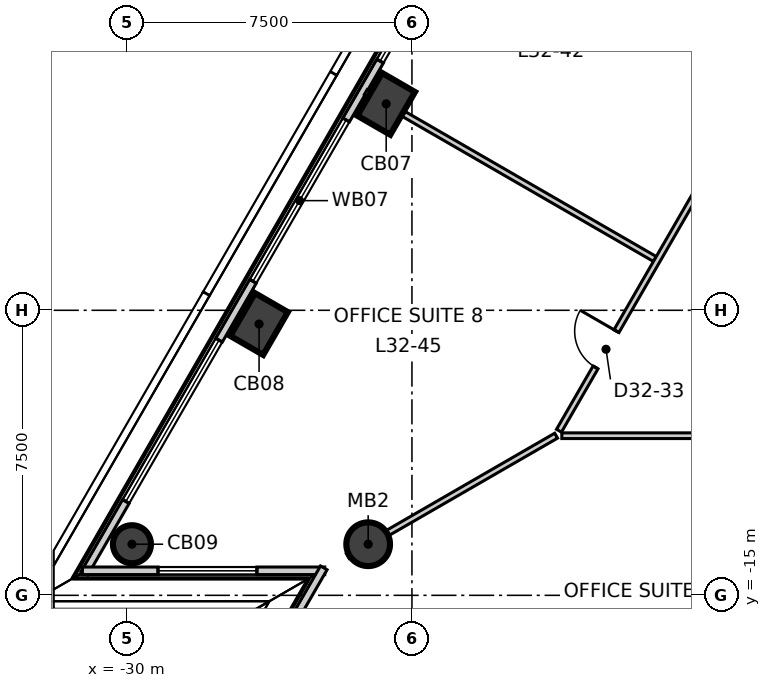
"""IFC4 building model, lengths in metres.
Left out: names, types, materials, properties, quantities, classifications, styles, units other than length and angle.
Written with IfcOpenShell. Run it as: python <this file> out.ifc"""

import sys

from ifc_helpers import new_model, si_unit, direction, frame, frame_2d, origin, origin_2d, place, context, subcontext, project, spatial, rectangle, circle, extrude, element, fill, save


model = new_model("IFC4")
c1 = context("Model", 3, precision=1e-05, world=origin(), true_north=direction((0.0, 1.0)))
c2 = subcontext(c1, "Body", "Model", "MODEL_VIEW")
j1 = project(units=[si_unit("LENGTHUNIT", "METRE"), si_unit("PLANEANGLEUNIT", "RADIAN")], contexts=[c1])
p1 = place(None, origin())
s1 = spatial("IfcSite", under=j1, at=p1, CompositionType="ELEMENT")
p2 = place(p1, origin())
s2 = spatial("IfcBuilding", under=s1, at=p2, CompositionType="ELEMENT")
p3 = place(p2, frame((0.0, 0.0, 140.3)))
s3 = spatial("IfcBuildingStorey", under=s2, at=p3, CompositionType="ELEMENT", Elevation=140.3)
for number, where, z_axis, x_axis in (
    (1, (-23.178, -2.068, -0.3), (0.0, 0.0, 1.0), (0.5, 0.866, 0.0)),
    (2, (-26.523, -7.861, -0.3), (0.0, 0.0, 1.0), (0.5, 0.866, 0.0)),
):
    element("IfcColumn", number, at=place(p3, frame(where, z_axis=z_axis, x_axis=x_axis)), inside=s3, PredefinedType="COLUMN", context=c2, shape_type="SweptSolid", body=[
        extrude(rectangle(XDim=1.3, YDim=1.0, at=origin_2d()), origin(), (0.0, 0.0, 1.0), 4.0),
    ])
p4 = place(p3, frame((-29.868, -13.655, -0.3), z_axis=(0.0, 0.0, 1.0), x_axis=(0.5, 0.866025403784, 0.0)))
e3 = element("IfcColumn", 3, at=p4, inside=s3, PredefinedType="COLUMN", context=c2, shape_type="SweptSolid", body=[
    extrude(circle(Radius=0.5, at=origin_2d()), origin(), (0.0, 0.0, 1.0), 4.0),
])
p5 = place(p3, frame((-23.652, -13.655, -0.3), z_axis=(0.0, 0.0, 1.0), x_axis=(1.0, 0.0, 0.0)))
e4 = element("IfcColumn", 4, at=p5, inside=s3, PredefinedType="COLUMN", context=c2, shape_type="SweptSolid", body=[
    extrude(circle(Radius=0.575, at=origin_2d()), origin(), (0.0, 0.0, 1.0), 4.0),
])
p6 = place(p3, frame((-3.063, 34.172, 0.0), z_axis=(0.0, 0.0, 1.0), x_axis=(-0.500008098571, -0.866020728022, 0.0)))
e5 = element("IfcWall", 5, at=p6, inside=s3, PredefinedType="ELEMENTEDWALL", context=c2, shape_type="SweptSolid", body=[
    extrude(rectangle(XDim=56.105, YDim=0.2, at=frame_2d((28.052, 0.0))), origin(), (0.0, 0.0, 1.0), 3.7),
])
p7 = place(p6, frame((2.197, 0.0, 0.9)))
e6 = element("IfcOpeningElement", 6, at=p7, cuts=e5, PredefinedType="OPENING", context=c2, shape_type="SweptSolid", body=[
    extrude(rectangle(XDim=4.9, YDim=2.5, at=frame_2d((2.45, 1.25))), frame((0.0, 0.11, 0.0), z_axis=(0.0, -1.0, 0.0), x_axis=(1.0, 0.0, 0.0)), (0.0, 0.0, 1.0), 0.22),
])
p8 = place(p6, frame((8.887, 0.0, 0.9)))
e7 = element("IfcOpeningElement", 7, at=p8, cuts=e5, PredefinedType="OPENING", context=c2, shape_type="SweptSolid", body=[
    extrude(rectangle(XDim=4.9, YDim=2.5, at=frame_2d((2.45, 1.25))), frame((0.0, 0.11, 0.0), z_axis=(0.0, -1.0, 0.0), x_axis=(1.0, 0.0, 0.0)), (0.0, 0.0, 1.0), 0.22),
])
p9 = place(p6, frame((15.577, 0.0, 0.9)))
e8 = element("IfcOpeningElement", 8, at=p9, cuts=e5, PredefinedType="OPENING", context=c2, shape_type="SweptSolid", body=[
    extrude(rectangle(XDim=4.9, YDim=2.5, at=frame_2d((2.45, 1.25))), frame((0.0, 0.11, 0.0), z_axis=(0.0, -1.0, 0.0), x_axis=(1.0, 0.0, 0.0)), (0.0, 0.0, 1.0), 0.22),
])
p10 = place(p6, frame((22.267, 0.0, 0.9)))
e9 = element("IfcOpeningElement", 9, at=p10, cuts=e5, PredefinedType="OPENING", context=c2, shape_type="SweptSolid", body=[
    extrude(rectangle(XDim=4.9, YDim=2.5, at=frame_2d((2.45, 1.25))), frame((0.0, 0.11, 0.0), z_axis=(0.0, -1.0, 0.0), x_axis=(1.0, 0.0, 0.0)), (0.0, 0.0, 1.0), 0.22),
])
p11 = place(p6, frame((28.957, 0.0, 0.9)))
e10 = element("IfcOpeningElement", 10, at=p11, cuts=e5, PredefinedType="OPENING", context=c2, shape_type="SweptSolid", body=[
    extrude(rectangle(XDim=4.9, YDim=2.5, at=frame_2d((2.45, 1.25))), frame((0.0, 0.11, 0.0), z_axis=(0.0, -1.0, 0.0), x_axis=(1.0, 0.0, 0.0)), (0.0, 0.0, 1.0), 0.22),
])
p12 = place(p6, frame((35.647, 0.0, 0.9)))
e11 = element("IfcOpeningElement", 11, at=p12, cuts=e5, PredefinedType="OPENING", context=c2, shape_type="SweptSolid", body=[
    extrude(rectangle(XDim=4.9, YDim=2.5, at=frame_2d((2.45, 1.25))), frame((0.0, 0.11, 0.0), z_axis=(0.0, -1.0, 0.0), x_axis=(1.0, 0.0, 0.0)), (0.0, 0.0, 1.0), 0.22),
])
p13 = place(p6, frame((42.337, 0.0, 0.9)))
e12 = element("IfcOpeningElement", 12, at=p13, cuts=e5, PredefinedType="OPENING", context=c2, shape_type="SweptSolid", body=[
    extrude(rectangle(XDim=4.9, YDim=2.5, at=frame_2d((2.45, 1.25))), frame((0.0, 0.11, 0.0), z_axis=(0.0, -1.0, 0.0), x_axis=(1.0, 0.0, 0.0)), (0.0, 0.0, 1.0), 0.22),
])
p14 = place(p6, frame((49.027, 0.0, 0.9)))
e13 = element("IfcOpeningElement", 13, at=p14, cuts=e5, PredefinedType="OPENING", context=c2, shape_type="SweptSolid", body=[
    extrude(rectangle(XDim=4.9, YDim=2.5, at=frame_2d((2.45, 1.25))), frame((0.0, 0.11, 0.0), z_axis=(0.0, -1.0, 0.0), x_axis=(1.0, 0.0, 0.0)), (0.0, 0.0, 1.0), 0.22),
])
p15 = place(p3, frame((-31.171, -14.355, 0.0), z_axis=(0.0, 0.0, 1.0), x_axis=(1.0, 0.0, 0.0)))
e14 = element("IfcWall", 14, at=p15, inside=s3, PredefinedType="ELEMENTEDWALL", context=c2, shape_type="SweptSolid", body=[
    extrude(rectangle(XDim=6.376, YDim=0.2, at=frame_2d((3.188, 0.0))), origin(), (0.0, 0.0, 1.0), 3.7),
])
p16 = place(p15, frame((1.99, 0.0, 0.9)))
e15 = element("IfcOpeningElement", 15, at=p16, cuts=e14, PredefinedType="OPENING", context=c2, shape_type="SweptSolid", body=[
    extrude(rectangle(XDim=2.6, YDim=2.5, at=frame_2d((1.3, 1.25))), frame((0.0, 0.11, 0.0), z_axis=(0.0, -1.0, 0.0), x_axis=(1.0, 0.0, 0.0)), (0.0, 0.0, 1.0), 0.22),
])
p17 = place(p3, frame((-24.82, -14.277, 0.0), z_axis=(0.0, 0.0, 1.0), x_axis=(-0.499919089554, -0.866072112413, 0.0)))
e16 = element("IfcWall", 16, at=p17, inside=s3, PredefinedType="ELEMENTEDWALL", context=c2, shape_type="SweptSolid", body=[
    extrude(rectangle(XDim=6.377, YDim=0.2, at=frame_2d((3.188, 0.0))), origin(), (0.0, 0.0, 1.0), 3.7),
])
p18 = place(p17, frame((1.39, 0.0, 0.9)))
e17 = element("IfcOpeningElement", 17, at=p18, cuts=e16, PredefinedType="OPENING", context=c2, shape_type="SweptSolid", body=[
    extrude(rectangle(XDim=2.6, YDim=2.5, at=frame_2d((1.3, 1.25))), frame((0.0, 0.11, 0.0), z_axis=(0.0, -1.0, 0.0), x_axis=(1.0, 0.0, 0.0)), (0.0, 0.0, 1.0), 0.22),
])
p19 = place(p3, frame((-24.189, -13.965, 0.0), z_axis=(0.0, 0.0, 1.0), x_axis=(0.865994217434, 0.500054012454, 0.0)))
e18 = element("IfcWall", 18, at=p19, inside=s3, PredefinedType="PARTITIONING", context=c2, shape_type="SweptSolid", body=[
    extrude(rectangle(XDim=6.331, YDim=0.15, at=frame_2d((3.166, 0.0))), origin(), (0.0, 0.0, 1.0), 3.15),
])
p20 = place(p3, frame((-23.715, -1.758, 0.0), z_axis=(0.0, 0.0, 1.0), x_axis=(0.866033311227, -0.499986303657, 0.0)))
e19 = element("IfcWall", 19, at=p20, inside=s3, PredefinedType="PARTITIONING", context=c2, shape_type="SweptSolid", body=[
    extrude(rectangle(XDim=8.784, YDim=0.15, at=frame_2d((4.392, 0.0))), origin(), (0.0, 0.0, 1.0), 3.7),
])
p21 = place(p3, frame((-18.556, -10.8, 0.0), z_axis=(0.0, 0.0, 1.0), x_axis=(1.0, 0.0, 0.0)))
e20 = element("IfcWall", 20, at=p21, inside=s3, PredefinedType="PARTITIONING", context=c2, shape_type="SweptSolid", body=[
    extrude(rectangle(XDim=10.89, YDim=0.15, at=frame_2d((5.445, 0.0))), origin(), (0.0, 0.0, 1.0), 3.7),
])
p22 = place(p21, frame((4.9, 0.0, 0.0)))
e21 = element("IfcOpeningElement", 21, at=p22, cuts=e20, PredefinedType="OPENING", context=c2, shape_type="SweptSolid", body=[
    extrude(rectangle(XDim=1.1, YDim=2.1, at=frame_2d((0.55, 1.05))), frame((0.0, 0.085, 0.0), z_axis=(0.0, -1.0, 0.0), x_axis=(1.0, 0.0, 0.0)), (0.0, 0.0, 1.0), 0.17),
])
p23 = place(p3, frame((-18.631, -10.669, 0.0), z_axis=(0.0, 0.0, 1.0), x_axis=(0.50004165882, 0.866001350717, 0.0)))
e22 = element("IfcWall", 22, at=p23, inside=s3, PredefinedType="PARTITIONING", context=c2, shape_type="SweptSolid", body=[
    extrude(rectangle(XDim=17.655, YDim=0.15, at=frame_2d((8.827, 0.0))), origin(), (0.0, 0.0, 1.0), 3.7),
])
p24 = place(p23, frame((10.206, 0.0, 0.0)))
e23 = element("IfcOpeningElement", 23, at=p24, cuts=e22, PredefinedType="OPENING", context=c2, shape_type="SweptSolid", body=[
    extrude(rectangle(XDim=1.1, YDim=2.1, at=frame_2d((0.55, 1.05))), frame((0.0, 0.085, 0.0), z_axis=(0.0, -1.0, 0.0), x_axis=(1.0, 0.0, 0.0)), (0.0, 0.0, 1.0), 0.17),
])
p25 = place(p23, frame((12.406, 0.0, 0.0)))
e24 = element("IfcOpeningElement", 24, at=p25, cuts=e22, PredefinedType="OPENING", context=c2, shape_type="SweptSolid", body=[
    extrude(rectangle(XDim=0.9, YDim=2.1, at=frame_2d((0.45, 1.05))), frame((0.0, 0.085, 0.0), z_axis=(0.0, -1.0, 0.0), x_axis=(1.0, 0.0, 0.0)), (0.0, 0.0, 1.0), 0.17),
])
p26 = place(p23, frame((1.925, 0.0, 0.0)))
e25 = element("IfcOpeningElement", 25, at=p26, cuts=e22, PredefinedType="OPENING", context=c2, shape_type="SweptSolid", body=[
    extrude(rectangle(XDim=1.1, YDim=2.1, at=frame_2d((0.55, 1.05))), frame((0.0, 0.085, 0.0), z_axis=(0.0, -1.0, 0.0), x_axis=(1.0, 0.0, 0.0)), (0.0, 0.0, 1.0), 0.17),
])
p27 = place(p12, origin())
e26 = element("IfcWindow", 26, at=p27, inside=s3, PartitioningType="SINGLE_PANEL", PredefinedType="WINDOW", context=c2, shape_type="SweptSolid", body=[
    extrude(rectangle(XDim=4.9, YDim=2.5, at=frame_2d((2.45, 1.25))), frame((0.0, 0.03, 0.0), z_axis=(0.0, -1.0, 0.0), x_axis=(1.0, 0.0, 0.0)), (0.0, 0.0, 1.0), 0.06),
])
fill(e11, e26)
p28 = place(p13, origin())
e27 = element("IfcWindow", 27, at=p28, inside=s3, PartitioningType="SINGLE_PANEL", PredefinedType="WINDOW", context=c2, shape_type="SweptSolid", body=[
    extrude(rectangle(XDim=4.9, YDim=2.5, at=frame_2d((2.45, 1.25))), frame((0.0, 0.03, 0.0), z_axis=(0.0, -1.0, 0.0), x_axis=(1.0, 0.0, 0.0)), (0.0, 0.0, 1.0), 0.06),
])
fill(e12, e27)
p29 = place(p14, origin())
e28 = element("IfcWindow", 28, at=p29, inside=s3, PartitioningType="SINGLE_PANEL", PredefinedType="WINDOW", context=c2, shape_type="SweptSolid", body=[
    extrude(rectangle(XDim=4.9, YDim=2.5, at=frame_2d((2.45, 1.25))), frame((0.0, 0.03, 0.0), z_axis=(0.0, -1.0, 0.0), x_axis=(1.0, 0.0, 0.0)), (0.0, 0.0, 1.0), 0.06),
])
fill(e13, e28)
p30 = place(p16, origin())
e29 = element("IfcWindow", 29, at=p30, inside=s3, PartitioningType="SINGLE_PANEL", PredefinedType="WINDOW", context=c2, shape_type="SweptSolid", body=[
    extrude(rectangle(XDim=2.6, YDim=2.5, at=frame_2d((1.3, 1.25))), frame((0.0, 0.03, 0.0), z_axis=(0.0, -1.0, 0.0), x_axis=(1.0, 0.0, 0.0)), (0.0, 0.0, 1.0), 0.06),
])
fill(e15, e29)
p31 = place(p26, origin())
e30 = element("IfcDoor", 30, at=p31, inside=s3, OperationType="SINGLE_SWING_LEFT", PredefinedType="DOOR", context=c2, shape_type="SweptSolid", body=[
    extrude(rectangle(XDim=1.1, YDim=2.1, at=frame_2d((0.55, 1.05))), frame((0.0, 0.025, 0.0), z_axis=(0.0, -1.0, 0.0), x_axis=(1.0, 0.0, 0.0)), (0.0, 0.0, 1.0), 0.05),
])
fill(e25, e30)
save(model, sys.argv[1])
